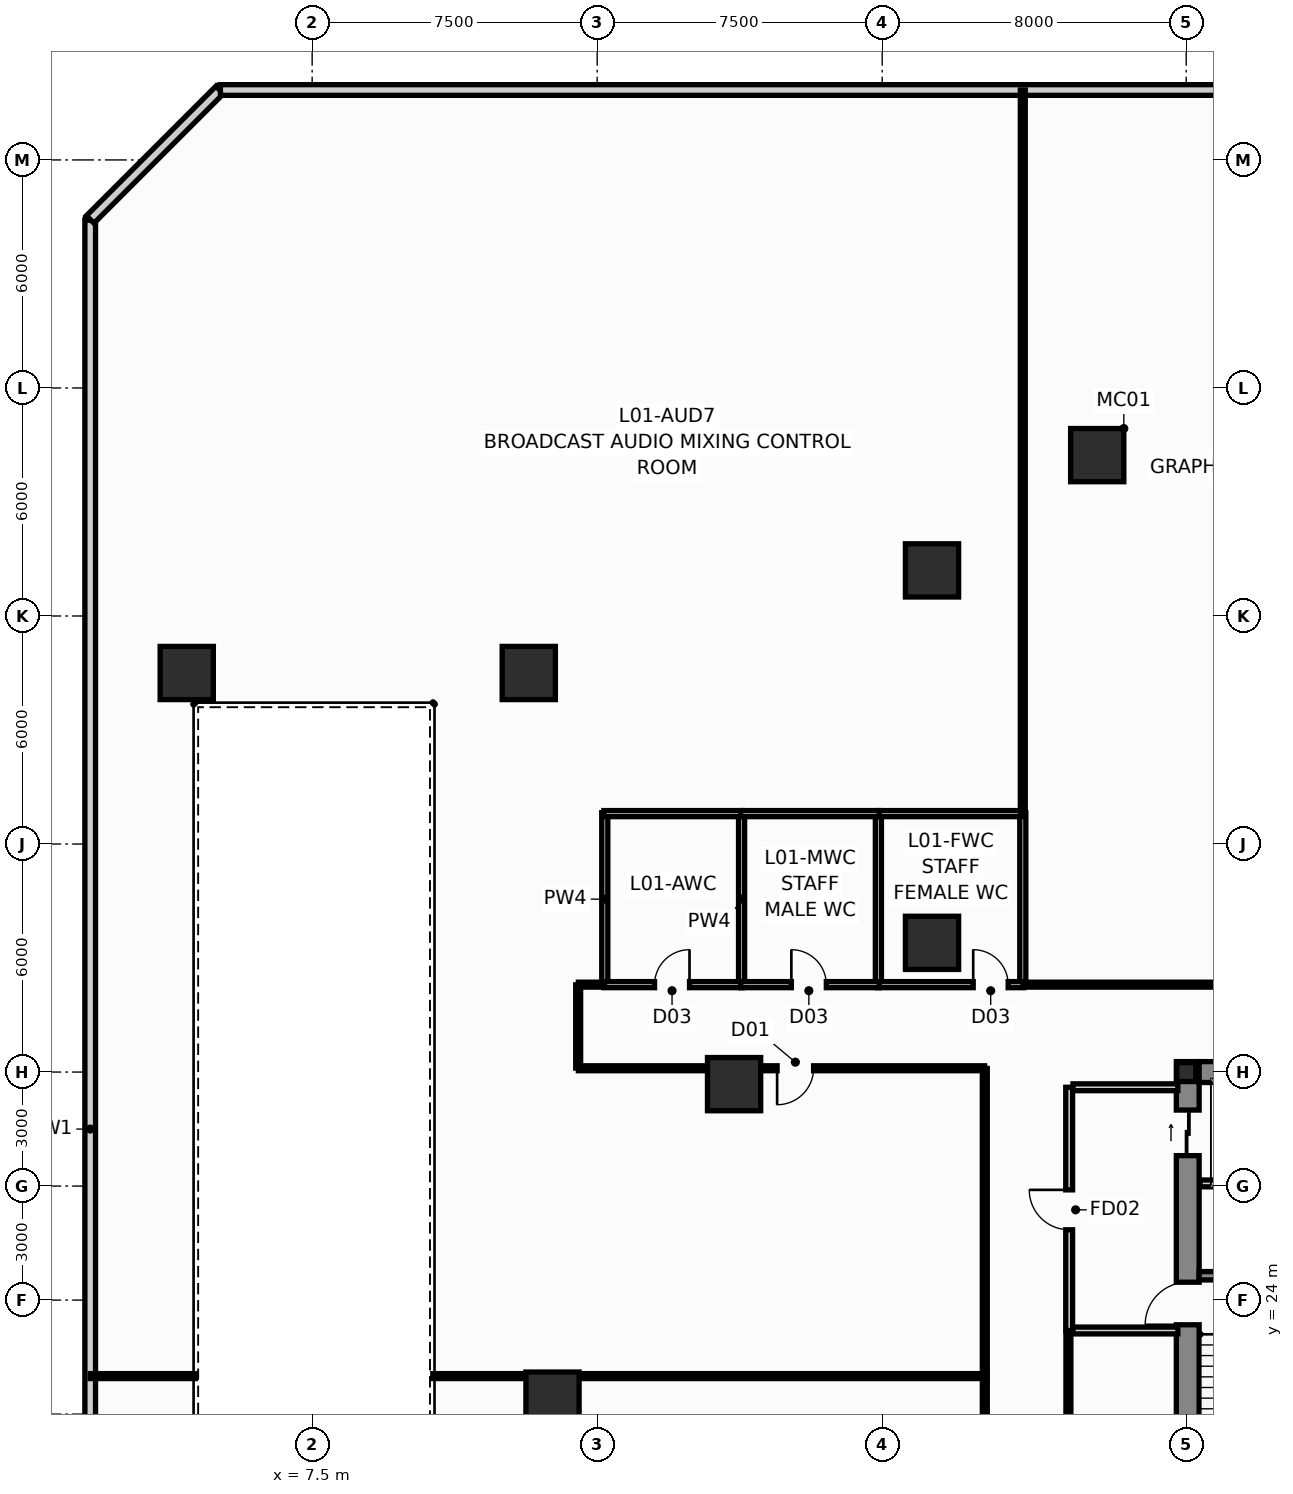
"""IFC4 building model, lengths in metres.
Left out: names, types, materials, properties, quantities, classifications, styles, units other than length and angle.
Written with IfcOpenShell. Run it as: python <this file> out.ifc"""

import sys

from ifc_helpers import new_model, si_unit, direction, frame, frame_2d, origin, origin_2d, place, context, subcontext, project, spatial, rectangle, hollow_rectangle, i_section, extrude, source, transform, mapped, element, fill, save


model = new_model("IFC4")
c1 = context("Model", 3, precision=1e-05, world=origin(), true_north=direction((0.0, 1.0)))
c2 = subcontext(c1, "Body", "Model", "MODEL_VIEW")
j1 = project(units=[si_unit("LENGTHUNIT", "METRE"), si_unit("PLANEANGLEUNIT", "RADIAN")], contexts=[c1])
p1 = place(None, origin())
s1 = spatial("IfcSite", under=j1, at=p1, CompositionType="ELEMENT")
p2 = place(p1, origin())
s2 = spatial("IfcBuilding", under=s1, at=p2, CompositionType="ELEMENT")
p3 = place(p2, frame((0.0, 0.0, 5.4)))
s3 = spatial("IfcBuildingStorey", under=s2, at=p3, CompositionType="ELEMENT", Elevation=5.4)
m1 = source(origin(), c2, "Body", "SweptSolid", [
    extrude(i_section(OverallWidth=0.5, OverallDepth=0.5, WebThickness=0.028, FlangeThickness=0.04, at=origin_2d()), origin(), (0.0, 0.0, 1.0), 4.8),
])
p4 = place(p3, frame((30.5, 30.0, 0.0), z_axis=(0.0, 0.0, 1.0), x_axis=(1.0, 0.0, 0.0)))
e1 = element("IfcColumn", 1, at=p4, inside=s3, PredefinedType="COLUMN", context=c2, shape_type="MappedRepresentation", body=[
    mapped(m1, transform((0.0, 0.0, 0.0), scale=1.0)),
])
p5 = place(p3, frame((30.54, 16.85, 0.0), z_axis=(0.0, 0.0, 1.0), x_axis=(0.0, 1.0, 0.0)))
e2 = element("IfcWall", 2, at=p5, inside=s3, PredefinedType="SHEAR", context=c2, shape_type="SweptSolid", body=[
    extrude(rectangle(XDim=13.425, YDim=0.6, at=frame_2d((6.712, 0.0))), origin(), (0.0, 0.0, 1.0), 4.8),
])
p6 = place(p5, frame((6.5, 0.0, 0.0)))
e3 = element("IfcOpeningElement", 3, at=p6, cuts=e2, PredefinedType="OPENING", context=c2, shape_type="SweptSolid", body=[
    extrude(rectangle(XDim=1.12, YDim=2.15, at=frame_2d((0.56, 1.075))), frame((0.0, 0.312, 0.0), z_axis=(0.0, -1.0, 0.0), x_axis=(1.0, 0.0, 0.0)), (0.0, 0.0, 1.0), 0.624),
])
p7 = place(p5, frame((10.95, 0.0, 0.0)))
e4 = element("IfcOpeningElement", 4, at=p7, cuts=e2, PredefinedType="OPENING", context=c2, shape_type="SweptSolid", body=[
    extrude(rectangle(XDim=1.2, YDim=2.2, at=frame_2d((0.6, 1.1))), frame((0.0, 0.312, 0.0), z_axis=(0.0, -1.0, 0.0), x_axis=(1.0, 0.0, 0.0)), (0.0, 0.0, 1.0), 0.624),
])
p8 = place(p3, frame((30.84, 30.0, 0.0), z_axis=(0.0, 0.0, 1.0), x_axis=(1.0, 0.0, 0.0)))
e5 = element("IfcWall", 5, at=p8, inside=s3, PredefinedType="SHEAR", context=c2, shape_type="SweptSolid", body=[
    extrude(rectangle(XDim=2.9, YDim=0.55, at=frame_2d((1.45, 0.0))), origin(), (0.0, 0.0, 1.0), 4.8),
])
p9 = place(p3, frame((30.84, 24.64, 0.0), z_axis=(0.0, 0.0, 1.0), x_axis=(1.0, 0.0, 0.0)))
e6 = element("IfcWall", 6, at=p9, inside=s3, PredefinedType="SHEAR", context=c2, shape_type="SweptSolid", body=[
    extrude(rectangle(XDim=2.9, YDim=0.22, at=frame_2d((1.45, 0.0))), origin(), (0.0, 0.0, 1.0), 4.8),
])
m2 = source(origin(), c2, "Body", "SweptSolid", [
    extrude(hollow_rectangle(XDim=1.4, YDim=1.4, WallThickness=0.08, at=origin_2d()), origin(), (0.0, 0.0, 1.0), 4.802),
])
p10 = place(p3, frame((28.158, 46.233, 0.0), z_axis=(0.023847509135, 0.001779664861, 0.999714023659), x_axis=(-0.074419924822, 0.99722699261, 0.0)))
e7 = element("IfcColumn", 7, at=p10, inside=s3, PredefinedType="COLUMN", context=c2, shape_type="MappedRepresentation", body=[
    mapped(m2, transform((0.0, 0.0, 0.0), scale=1.0)),
])
m3 = source(origin(), c2, "Body", "SweptSolid", [
    extrude(hollow_rectangle(XDim=1.4, YDim=1.4, WallThickness=0.08, at=origin_2d()), origin(), (0.0, 0.0, 1.0), 4.801),
])
p11 = place(p3, frame((18.603, 29.682, 0.0), z_axis=(0.014899529501, -0.013780793498, 0.999794025663), x_axis=(0.679008224545, 0.734130663438, 0.0)))
e8 = element("IfcColumn", 8, at=p11, inside=s3, PredefinedType="COLUMN", context=c2, shape_type="MappedRepresentation", body=[
    mapped(m3, transform((0.0, 0.0, 0.0), scale=1.0)),
])
p12 = place(p3, frame((13.825, 21.407, 0.0), z_axis=(0.01042374304, -0.021559351459, 0.999713228854), x_axis=(0.900293483537, 0.435283405956, 0.0)))
e9 = element("IfcColumn", 9, at=p12, inside=s3, PredefinedType="COLUMN", context=c2, shape_type="MappedRepresentation", body=[
    mapped(m2, transform((0.0, 0.0, 0.0), scale=1.0)),
])
m4 = source(origin(), c2, "Body", "SweptSolid", [
    extrude(hollow_rectangle(XDim=1.4, YDim=1.4, WallThickness=0.08, at=origin_2d()), origin(), (0.0, 0.0, 1.0), 4.8),
])
for number, where, z_axis, x_axis in (
    (10, (23.811, 33.4, 0.0), (0.0, 0.0, 1.0), (1.0, 0.0, 0.0)),
    (11, (23.811, 43.2, 0.0), (0.0, 0.0, 1.0), (1.0, 0.0, 0.0)),
    (12, (4.2, 40.5, 0.0), (0.0, 0.0, 1.0), (1.0, 0.0, 0.0)),
    (13, (13.2, 40.5, 0.0), (0.0, 0.0, 1.0), (1.0, 0.0, 0.0)),
):
    element("IfcColumn", number, at=place(p3, frame(where, z_axis=z_axis, x_axis=x_axis)), inside=s3, PredefinedType="COLUMN", context=c2, shape_type="MappedRepresentation", body=[
        mapped(m4, transform((0.0, 0.0, 0.0), scale=1.0)),
    ])
p13 = place(p3, frame((1.66, 4.586, 0.0), z_axis=(0.0, 0.0, 1.0), x_axis=(0.0, 1.0, 0.0)))
e14 = element("IfcWall", 14, at=p13, inside=s3, PredefinedType="STANDARD", context=c2, shape_type="SweptSolid", body=[
    extrude(rectangle(XDim=47.828, YDim=0.28, at=frame_2d((23.914, 0.0))), origin(), (0.0, 0.0, 1.0), 4.48),
])
p14 = place(p3, frame((1.66, 52.434, 0.0), z_axis=(0.0, 0.0, 1.0), x_axis=(0.707106781187, 0.707106781187, 0.0)))
e15 = element("IfcWall", 15, at=p14, inside=s3, PredefinedType="STANDARD", context=c2, shape_type="SweptSolid", body=[
    extrude(rectangle(XDim=4.817, YDim=0.28, at=frame_2d((2.408, 0.0))), origin(), (0.0, 0.0, 1.0), 4.48),
])
p15 = place(p3, frame((5.086, 55.84, 0.0), z_axis=(0.0, 0.0, 1.0), x_axis=(1.0, 0.0, 0.0)))
e16 = element("IfcWall", 16, at=p15, inside=s3, PredefinedType="STANDARD", context=c2, shape_type="SweptSolid", body=[
    extrude(rectangle(XDim=71.828, YDim=0.28, at=frame_2d((35.914, 0.0))), origin(), (0.0, 0.0, 1.0), 4.48),
])
p16 = place(p3, frame((27.42, 23.2, 0.0), z_axis=(0.0, 0.0, 1.0), x_axis=(0.0, 1.0, 0.0)))
e17 = element("IfcWall", 17, at=p16, inside=s3, PredefinedType="PARTITIONING", context=c2, shape_type="SweptSolid", body=[
    extrude(rectangle(XDim=6.4, YDim=0.18, at=frame_2d((3.2, 0.0))), origin(), (0.0, 0.0, 1.0), 4.106),
])
p17 = place(p16, frame((2.65, 0.0, 0.0)))
e18 = element("IfcOpeningElement", 18, at=p17, cuts=e17, PredefinedType="OPENING", context=c2, shape_type="SweptSolid", body=[
    extrude(rectangle(XDim=1.05, YDim=2.15, at=frame_2d((0.525, 1.075))), frame((0.0, 0.102, 0.0), z_axis=(0.0, -1.0, 0.0), x_axis=(1.0, 0.0, 0.0)), (0.0, 0.0, 1.0), 0.204),
])
p18 = place(p3, frame((27.52, 23.2, 0.0), z_axis=(0.0, 0.0, 1.0), x_axis=(1.0, 0.0, 0.0)))
e19 = element("IfcWall", 19, at=p18, inside=s3, PredefinedType="PARTITIONING", context=c2, shape_type="SweptSolid", body=[
    extrude(rectangle(XDim=2.76, YDim=0.18, at=frame_2d((1.38, 0.0))), origin(), (0.0, 0.0, 1.0), 4.48),
])
p19 = place(p3, frame((27.52, 29.6, 0.0), z_axis=(0.0, 0.0, 1.0), x_axis=(1.0, 0.0, 0.0)))
e20 = element("IfcWall", 20, at=p19, inside=s3, PredefinedType="PARTITIONING", context=c2, shape_type="SweptSolid", body=[
    extrude(rectangle(XDim=2.76, YDim=0.18, at=frame_2d((1.38, 0.0))), origin(), (0.0, 0.0, 1.0), 3.854),
])
p20 = place(p3, frame((30.86, 27.07, 0.0), z_axis=(0.0, 0.0, 1.0), x_axis=(1.0, 0.0, 0.0)))
e21 = element("IfcWall", 21, at=p20, inside=s3, PredefinedType="PARTITIONING", context=c2, shape_type="SweptSolid", body=[
    extrude(rectangle(XDim=2.9, YDim=0.18, at=frame_2d((1.45, 0.0))), origin(), (0.0, 0.0, 1.0), 4.48),
])
for number, where, z_axis, x_axis in (
    (22, (15.2, 32.275, 0.0), (0.0, 0.0, 1.0), (0.0, 1.0, 0.0)),
    (23, (18.8, 32.275, 0.0), (0.0, 0.0, 1.0), (0.0, 1.0, 0.0)),
    (24, (22.4, 32.275, 0.0), (0.0, 0.0, 1.0), (0.0, 1.0, 0.0)),
    (25, (26.2, 32.275, 0.0), (0.0, 0.0, 1.0), (0.0, 1.0, 0.0)),
):
    element("IfcWall", number, at=place(p3, frame(where, z_axis=z_axis, x_axis=x_axis)), inside=s3, PredefinedType="PLUMBINGWALL", context=c2, shape_type="SweptSolid", body=[
        extrude(rectangle(XDim=4.55, YDim=0.16, at=frame_2d((2.275, 0.0))), origin(), (0.0, 0.0, 1.0), 4.48),
    ])
p21 = place(p3, frame((22.375, 32.3, 0.0), z_axis=(0.0, 0.0, 1.0), x_axis=(1.0, 0.0, 0.0)))
e26 = element("IfcWall", 26, at=p21, inside=s3, PredefinedType="PLUMBINGWALL", context=c2, shape_type="SweptSolid", body=[
    extrude(rectangle(XDim=3.85, YDim=0.16, at=frame_2d((1.925, 0.0))), origin(), (0.0, 0.0, 1.0), 4.48),
])
p22 = place(p21, frame((2.52, 0.0, 0.0)))
e27 = element("IfcOpeningElement", 27, at=p22, cuts=e26, PredefinedType="OPENING", context=c2, shape_type="SweptSolid", body=[
    extrude(rectangle(XDim=0.92, YDim=2.1, at=frame_2d((0.46, 1.05))), frame((0.0, 0.092, 0.0), z_axis=(0.0, -1.0, 0.0), x_axis=(1.0, 0.0, 0.0)), (0.0, 0.0, 1.0), 0.184),
])
p23 = place(p3, frame((22.375, 36.8, 0.0), z_axis=(0.0, 0.0, 1.0), x_axis=(1.0, 0.0, 0.0)))
e28 = element("IfcWall", 28, at=p23, inside=s3, PredefinedType="PLUMBINGWALL", context=c2, shape_type="SweptSolid", body=[
    extrude(rectangle(XDim=3.85, YDim=0.16, at=frame_2d((1.925, 0.0))), origin(), (0.0, 0.0, 1.0), 4.059),
])
p24 = place(p3, frame((15.175, 32.3, 0.0), z_axis=(0.0, 0.0, 1.0), x_axis=(1.0, 0.0, 0.0)))
e29 = element("IfcWall", 29, at=p24, inside=s3, PredefinedType="PLUMBINGWALL", context=c2, shape_type="SweptSolid", body=[
    extrude(rectangle(XDim=3.65, YDim=0.16, at=frame_2d((1.825, 0.0))), origin(), (0.0, 0.0, 1.0), 4.48),
])
p25 = place(p24, frame((1.335, 0.0, 0.0)))
e30 = element("IfcOpeningElement", 30, at=p25, cuts=e29, PredefinedType="OPENING", context=c2, shape_type="SweptSolid", body=[
    extrude(rectangle(XDim=0.92, YDim=2.1, at=frame_2d((0.46, 1.05))), frame((0.0, 0.092, 0.0), z_axis=(0.0, -1.0, 0.0), x_axis=(1.0, 0.0, 0.0)), (0.0, 0.0, 1.0), 0.184),
])
p26 = place(p3, frame((15.175, 36.8, 0.0), z_axis=(0.0, 0.0, 1.0), x_axis=(1.0, 0.0, 0.0)))
e31 = element("IfcWall", 31, at=p26, inside=s3, PredefinedType="PLUMBINGWALL", context=c2, shape_type="SweptSolid", body=[
    extrude(rectangle(XDim=3.65, YDim=0.16, at=frame_2d((1.825, 0.0))), origin(), (0.0, 0.0, 1.0), 4.48),
])
p27 = place(p3, frame((18.775, 32.3, 0.0), z_axis=(0.0, 0.0, 1.0), x_axis=(1.0, 0.0, 0.0)))
e32 = element("IfcWall", 32, at=p27, inside=s3, PredefinedType="PLUMBINGWALL", context=c2, shape_type="SweptSolid", body=[
    extrude(rectangle(XDim=3.65, YDim=0.16, at=frame_2d((1.825, 0.0))), origin(), (0.0, 0.0, 1.0), 4.48),
])
p28 = place(p27, frame((1.335, 0.0, 0.0)))
e33 = element("IfcOpeningElement", 33, at=p28, cuts=e32, PredefinedType="OPENING", context=c2, shape_type="SweptSolid", body=[
    extrude(rectangle(XDim=0.92, YDim=2.1, at=frame_2d((0.46, 1.05))), frame((0.0, 0.092, 0.0), z_axis=(0.0, -1.0, 0.0), x_axis=(1.0, 0.0, 0.0)), (0.0, 0.0, 1.0), 0.184),
])
p29 = place(p3, frame((18.775, 36.8, 0.0), z_axis=(0.0, 0.0, 1.0), x_axis=(1.0, 0.0, 0.0)))
e34 = element("IfcWall", 34, at=p29, inside=s3, PredefinedType="PLUMBINGWALL", context=c2, shape_type="SweptSolid", body=[
    extrude(rectangle(XDim=3.65, YDim=0.16, at=frame_2d((1.825, 0.0))), origin(), (0.0, 0.0, 1.0), 4.48),
])
p30 = place(p3, frame((26.2, 36.805, 0.0), z_axis=(0.0, 0.0, 1.0), x_axis=(0.0, 1.0, 0.0)))
e35 = element("IfcWall", 35, at=p30, inside=s3, PredefinedType="PARTITIONING", context=c2, shape_type="SweptSolid", body=[
    extrude(rectangle(XDim=19.035, YDim=0.13, at=frame_2d((9.518, 0.0))), origin(), (0.0, 0.0, 1.0), 4.48),
])
p31 = place(p3, frame((26.205, 32.3, 0.0), z_axis=(0.0, 0.0, 1.0), x_axis=(1.0, 0.0, 0.0)))
e36 = element("IfcWall", 36, at=p31, inside=s3, PredefinedType="PARTITIONING", context=c2, shape_type="SweptSolid", body=[
    extrude(rectangle(XDim=16.29, YDim=0.13, at=frame_2d((8.145, 0.0))), origin(), (0.0, 0.0, 1.0), 4.48),
])
p32 = place(p31, frame((7.665, 0.0, 0.0)))
e37 = element("IfcOpeningElement", 37, at=p32, cuts=e36, PredefinedType="OPENING", context=c2, shape_type="SweptSolid", body=[
    extrude(rectangle(XDim=0.96, YDim=2.15, at=frame_2d((0.48, 1.075))), frame((0.0, 0.077, 0.0), z_axis=(0.0, -1.0, 0.0), x_axis=(1.0, 0.0, 0.0)), (0.0, 0.0, 1.0), 0.154),
])
p33 = place(p3, frame((10.675, 22.0, 0.0), z_axis=(0.0, 0.0, 1.0), x_axis=(1.0, 0.0, 0.0)))
e38 = element("IfcWall", 38, at=p33, inside=s3, PredefinedType="PARTITIONING", context=c2, shape_type="SweptSolid", body=[
    extrude(rectangle(XDim=14.52, YDim=0.13, at=frame_2d((7.26, 0.0))), origin(), (0.0, 0.0, 1.0), 4.48),
])
p34 = place(p3, frame((25.195, 30.1, 0.0), z_axis=(0.0, 0.0, 1.0), x_axis=(-1.0, 0.0, 0.0)))
e39 = element("IfcWall", 39, at=p34, inside=s3, PredefinedType="PARTITIONING", context=c2, shape_type="SweptSolid", body=[
    extrude(rectangle(XDim=10.69, YDim=0.13, at=frame_2d((5.345, 0.0))), origin(), (0.0, 0.0, 1.0), 3.854),
])
p35 = place(p34, frame((4.5, 0.0, 0.0)))
e40 = element("IfcOpeningElement", 40, at=p35, cuts=e39, PredefinedType="OPENING", context=c2, shape_type="SweptSolid", body=[
    extrude(rectangle(XDim=0.96, YDim=2.15, at=frame_2d((0.48, 1.075))), frame((0.0, 0.077, 0.0), z_axis=(0.0, -1.0, 0.0), x_axis=(1.0, 0.0, 0.0)), (0.0, 0.0, 1.0), 0.154),
])
p36 = place(p3, frame((25.2, 12.205, 0.0), z_axis=(0.0, 0.0, 1.0), x_axis=(0.0, 1.0, 0.0)))
e41 = element("IfcWall", 41, at=p36, inside=s3, PredefinedType="PARTITIONING", context=c2, shape_type="SweptSolid", body=[
    extrude(rectangle(XDim=9.79, YDim=0.13, at=frame_2d((4.895, 0.0))), origin(), (0.0, 0.0, 1.0), 4.48),
])
p37 = place(p36, frame((4.415, 0.0, 0.0)))
e42 = element("IfcOpeningElement", 42, at=p37, cuts=e41, PredefinedType="OPENING", context=c2, shape_type="SweptSolid", body=[
    extrude(rectangle(XDim=0.96, YDim=2.15, at=frame_2d((0.48, 1.075))), frame((0.0, 0.077, 0.0), z_axis=(0.0, -1.0, 0.0), x_axis=(1.0, 0.0, 0.0)), (0.0, 0.0, 1.0), 0.154),
])
p38 = place(p3, frame((27.4, 14.355, 0.0), z_axis=(0.0, 0.0, 1.0), x_axis=(0.0, 1.0, 0.0)))
e43 = element("IfcWall", 43, at=p38, inside=s3, PredefinedType="PARTITIONING", context=c2, shape_type="SweptSolid", body=[
    extrude(rectangle(XDim=8.75, YDim=0.13, at=frame_2d((4.375, 0.0))), origin(), (0.0, 0.0, 1.0), 4.106),
])
p39 = place(p38, frame((3.895, 0.0, 0.0)))
e44 = element("IfcOpeningElement", 44, at=p39, cuts=e43, PredefinedType="OPENING", context=c2, shape_type="SweptSolid", body=[
    extrude(rectangle(XDim=0.96, YDim=2.15, at=frame_2d((0.48, 1.075))), frame((0.0, 0.077, 0.0), z_axis=(0.0, -1.0, 0.0), x_axis=(1.0, 0.0, 0.0)), (0.0, 0.0, 1.0), 0.154),
])
p40 = place(p3, frame((25.2, 22.005, 0.0), z_axis=(0.0, 0.0, 1.0), x_axis=(0.0, 1.0, 0.0)))
e45 = element("IfcWall", 45, at=p40, inside=s3, PredefinedType="PARTITIONING", context=c2, shape_type="SweptSolid", body=[
    extrude(rectangle(XDim=8.09, YDim=0.13, at=frame_2d((4.045, 0.0))), origin(), (0.0, 0.0, 1.0), 4.106),
])
p41 = place(p3, frame((1.66, 22.0, 0.0), z_axis=(0.0, 0.0, 1.0), x_axis=(1.0, 0.0, 0.0)))
e46 = element("IfcWall", 46, at=p41, inside=s3, PredefinedType="PARTITIONING", context=c2, shape_type="SweptSolid", body=[
    extrude(rectangle(XDim=2.765, YDim=0.13, at=frame_2d((1.383, 0.0))), origin(), (0.0, 0.0, 1.0), 4.48),
])
p42 = place(p3, frame((14.5, 30.105, 0.0), z_axis=(0.0, 0.0, 1.0), x_axis=(0.0, 1.0, 0.0)))
e47 = element("IfcWall", 47, at=p42, inside=s3, PredefinedType="PARTITIONING", context=c2, shape_type="SweptSolid", body=[
    extrude(rectangle(XDim=2.19, YDim=0.13, at=frame_2d((1.095, 0.0))), origin(), (0.0, 0.0, 1.0), 4.48),
])
p43 = place(p3, frame((14.505, 32.3, 0.0), z_axis=(0.0, 0.0, 1.0), x_axis=(1.0, 0.0, 0.0)))
e48 = element("IfcWall", 48, at=p43, inside=s3, PredefinedType="PARTITIONING", context=c2, shape_type="SweptSolid", body=[
    extrude(rectangle(XDim=0.69, YDim=0.13, at=frame_2d((0.345, 0.0))), origin(), (0.0, 0.0, 1.0), 4.48),
])
p44 = place(p6, origin())
e49 = element("IfcDoor", 49, at=p44, inside=s3, OperationType="SINGLE_SWING_LEFT", PredefinedType="DOOR", context=c2, shape_type="SweptSolid", body=[
    extrude(rectangle(XDim=1.12, YDim=2.15, at=frame_2d((0.56, 1.075))), frame((0.0, 0.025, 0.0), z_axis=(0.0, -1.0, 0.0), x_axis=(1.0, 0.0, 0.0)), (0.0, 0.0, 1.0), 0.05),
])
fill(e3, e49)
p45 = place(p7, origin())
e50 = element("IfcDoor", 50, at=p45, inside=s3, OperationType="SLIDING_TO_LEFT", PredefinedType="DOOR", context=c2, shape_type="SweptSolid", body=[
    extrude(rectangle(XDim=1.2, YDim=2.2, at=frame_2d((0.6, 1.1))), frame((0.0, 0.025, 0.0), z_axis=(0.0, -1.0, 0.0), x_axis=(1.0, 0.0, 0.0)), (0.0, 0.0, 1.0), 0.05),
])
fill(e4, e50)
p46 = place(p17, origin())
e51 = element("IfcDoor", 51, at=p46, inside=s3, OperationType="SINGLE_SWING_RIGHT", PredefinedType="DOOR", context=c2, shape_type="SweptSolid", body=[
    extrude(rectangle(XDim=1.05, YDim=2.15, at=frame_2d((0.525, 1.075))), frame((0.0, 0.025, 0.0), z_axis=(0.0, -1.0, 0.0), x_axis=(1.0, 0.0, 0.0)), (0.0, 0.0, 1.0), 0.05),
])
fill(e18, e51)
p47 = place(p22, origin())
e52 = element("IfcDoor", 52, at=p47, inside=s3, OperationType="SINGLE_SWING_LEFT", PredefinedType="DOOR", context=c2, shape_type="SweptSolid", body=[
    extrude(rectangle(XDim=0.92, YDim=2.1, at=frame_2d((0.46, 1.05))), frame((0.0, 0.025, 0.0), z_axis=(0.0, -1.0, 0.0), x_axis=(1.0, 0.0, 0.0)), (0.0, 0.0, 1.0), 0.05),
])
fill(e27, e52)
p48 = place(p25, origin())
e53 = element("IfcDoor", 53, at=p48, inside=s3, OperationType="SINGLE_SWING_RIGHT", PredefinedType="DOOR", context=c2, shape_type="SweptSolid", body=[
    extrude(rectangle(XDim=0.92, YDim=2.1, at=frame_2d((0.46, 1.05))), frame((0.0, 0.025, 0.0), z_axis=(0.0, -1.0, 0.0), x_axis=(1.0, 0.0, 0.0)), (0.0, 0.0, 1.0), 0.05),
])
fill(e30, e53)
p49 = place(p28, origin())
e54 = element("IfcDoor", 54, at=p49, inside=s3, OperationType="SINGLE_SWING_LEFT", PredefinedType="DOOR", context=c2, shape_type="SweptSolid", body=[
    extrude(rectangle(XDim=0.92, YDim=2.1, at=frame_2d((0.46, 1.05))), frame((0.0, 0.025, 0.0), z_axis=(0.0, -1.0, 0.0), x_axis=(1.0, 0.0, 0.0)), (0.0, 0.0, 1.0), 0.05),
])
fill(e33, e54)
p50 = place(p35, origin())
e55 = element("IfcDoor", 55, at=p50, inside=s3, OperationType="SINGLE_SWING_RIGHT", PredefinedType="DOOR", context=c2, shape_type="SweptSolid", body=[
    extrude(rectangle(XDim=0.96, YDim=2.15, at=frame_2d((0.48, 1.075))), frame((0.0, 0.025, 0.0), z_axis=(0.0, -1.0, 0.0), x_axis=(1.0, 0.0, 0.0)), (0.0, 0.0, 1.0), 0.05),
])
fill(e40, e55)
save(model, sys.argv[1])
